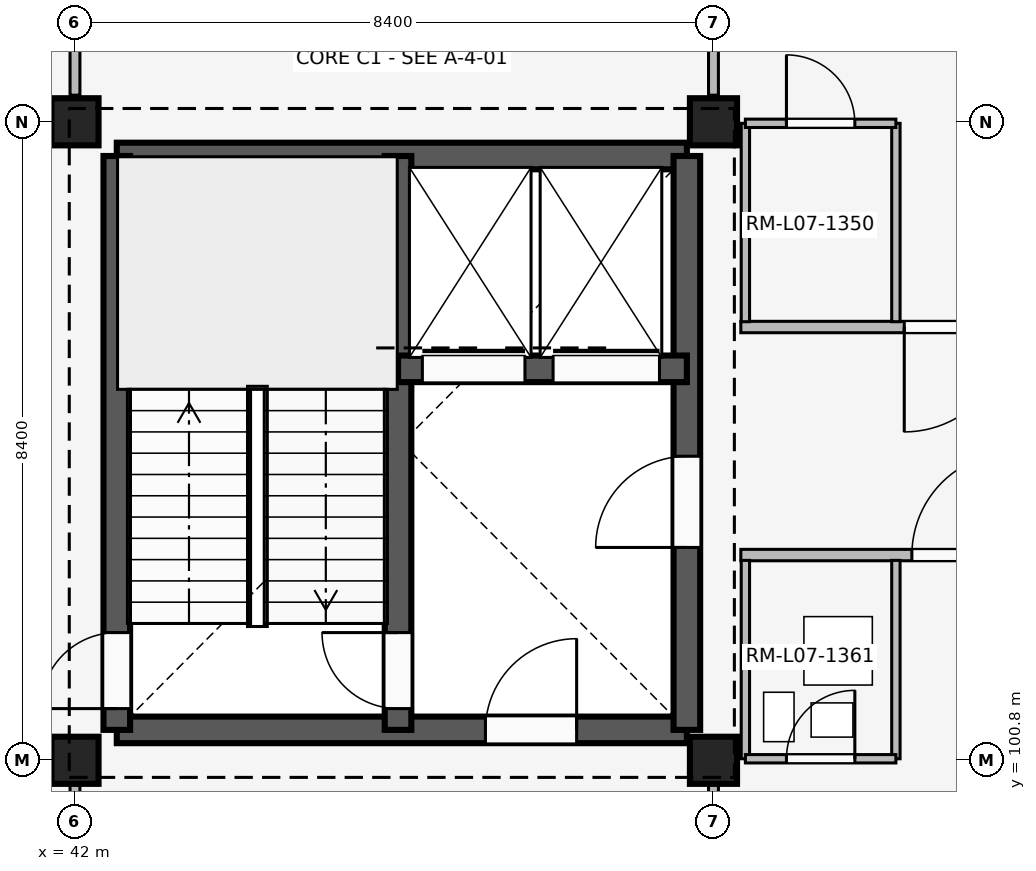
"""IFC4 building model, lengths in metres.
Left out: names, types, materials, properties, quantities, classifications, styles, units other than length and angle.
Written with IfcOpenShell. Run it as: python <this file> out.ifc"""

import sys

from ifc_helpers import new_model, si_unit, direction, frame, frame_2d, origin, origin_2d, place, context, subcontext, project, spatial, rectangle, extrude, element, fill, save


model = new_model("IFC4")
c1 = context("Model", 3, precision=1e-05, world=origin(), true_north=direction((0.0, 1.0)))
c2 = subcontext(c1, "Body", "Model", "MODEL_VIEW")
j1 = project(units=[si_unit("LENGTHUNIT", "METRE"), si_unit("PLANEANGLEUNIT", "RADIAN")], contexts=[c1])
p1 = place(None, origin())
s1 = spatial("IfcSite", under=j1, at=p1, CompositionType="ELEMENT")
p2 = place(p1, origin())
s2 = spatial("IfcBuilding", under=s1, at=p2, CompositionType="ELEMENT")
p3 = place(p2, frame((0.0, 0.0, 28.8)))
s3 = spatial("IfcBuildingStorey", under=s2, at=p3, CompositionType="ELEMENT", Elevation=28.8)
for number, where, z_axis, x_axis in (
    (1, (42.0, 100.8, 0.0), (0.0, 0.0, 1.0), (1.0, 0.0, 0.0)),
    (2, (42.0, 109.2, 0.0), (0.0, 0.0, 1.0), (1.0, 0.0, 0.0)),
    (3, (50.4, 100.8, 0.0), (0.0, 0.0, 1.0), (1.0, 0.0, 0.0)),
    (4, (50.4, 109.2, 0.0), (0.0, 0.0, 1.0), (1.0, 0.0, 0.0)),
):
    element("IfcColumn", number, at=place(p3, frame(where, z_axis=z_axis, x_axis=x_axis)), inside=s3, PredefinedType="COLUMN", context=c2, shape_type="SweptSolid", body=[
        extrude(rectangle(XDim=0.62, YDim=0.62, at=origin_2d()), origin(), (0.0, 0.0, 1.0), 4.2),
    ])
p4 = place(p3, frame((42.55, 101.2, 0.0), z_axis=(0.0, 0.0, 1.0), x_axis=(1.0, 0.0, 0.0)))
e5 = element("IfcWall", 5, at=p4, inside=s3, PredefinedType="SHEAR", context=c2, shape_type="SweptSolid", body=[
    extrude(rectangle(XDim=7.5, YDim=0.35, at=frame_2d((3.75, 0.0))), origin(), (0.0, 0.0, 1.0), 3.94),
])
p5 = place(p4, frame((4.85, 0.0, 0.0)))
e6 = element("IfcOpeningElement", 6, at=p5, cuts=e5, PredefinedType="OPENING", context=c2, shape_type="SweptSolid", body=[
    extrude(rectangle(XDim=1.2, YDim=2.2, at=frame_2d((0.6, 1.1))), frame((0.0, 0.185, 0.0), z_axis=(0.0, -1.0, 0.0), x_axis=(1.0, 0.0, 0.0)), (0.0, 0.0, 1.0), 0.37),
])
p6 = place(p3, frame((42.55, 108.75, 0.0), z_axis=(0.0, 0.0, 1.0), x_axis=(1.0, 0.0, 0.0)))
e7 = element("IfcWall", 7, at=p6, inside=s3, PredefinedType="SHEAR", context=c2, shape_type="SweptSolid", body=[
    extrude(rectangle(XDim=7.5, YDim=0.35, at=frame_2d((3.75, 0.0))), origin(), (0.0, 0.0, 1.0), 3.94),
])
p7 = place(p3, frame((42.55, 101.2, 0.0), z_axis=(0.0, 0.0, 1.0), x_axis=(0.0, 1.0, 0.0)))
e8 = element("IfcWall", 8, at=p7, inside=s3, PredefinedType="SHEAR", context=c2, shape_type="SweptSolid", body=[
    extrude(rectangle(XDim=7.55, YDim=0.35, at=frame_2d((3.775, 0.0))), origin(), (0.0, 0.0, 1.0), 3.94),
])
p8 = place(p7, frame((0.28, 0.0, 0.0)))
e9 = element("IfcOpeningElement", 9, at=p8, cuts=e8, PredefinedType="OPENING", context=c2, shape_type="SweptSolid", body=[
    extrude(rectangle(XDim=1.0, YDim=2.15, at=frame_2d((0.5, 1.075))), frame((0.0, 0.185, 0.0), z_axis=(0.0, -1.0, 0.0), x_axis=(1.0, 0.0, 0.0)), (0.0, 0.0, 1.0), 0.37),
])
p9 = place(p3, frame((50.05, 101.2, 0.0), z_axis=(0.0, 0.0, 1.0), x_axis=(0.0, 1.0, 0.0)))
e10 = element("IfcWall", 10, at=p9, inside=s3, PredefinedType="SHEAR", context=c2, shape_type="SweptSolid", body=[
    extrude(rectangle(XDim=7.55, YDim=0.35, at=frame_2d((3.775, 0.0))), origin(), (0.0, 0.0, 1.0), 3.94),
])
p10 = place(p9, frame((2.4, 0.0, 0.0)))
e11 = element("IfcOpeningElement", 11, at=p10, cuts=e10, PredefinedType="OPENING", context=c2, shape_type="SweptSolid", body=[
    extrude(rectangle(XDim=1.2, YDim=2.2, at=frame_2d((0.6, 1.1))), frame((0.0, 0.185, 0.0), z_axis=(0.0, -1.0, 0.0), x_axis=(1.0, 0.0, 0.0)), (0.0, 0.0, 1.0), 0.37),
])
p11 = place(p3, frame((46.25, 101.2, 0.0), z_axis=(0.0, 0.0, 1.0), x_axis=(0.0, 1.0, 0.0)))
e12 = element("IfcWall", 12, at=p11, inside=s3, PredefinedType="SHEAR", context=c2, shape_type="SweptSolid", body=[
    extrude(rectangle(XDim=7.55, YDim=0.35, at=frame_2d((3.775, 0.0))), origin(), (0.0, 0.0, 1.0), 3.94),
])
p12 = place(p11, frame((0.28, 0.0, 0.0)))
e13 = element("IfcOpeningElement", 13, at=p12, cuts=e12, PredefinedType="OPENING", context=c2, shape_type="SweptSolid", body=[
    extrude(rectangle(XDim=1.0, YDim=2.15, at=frame_2d((0.5, 1.075))), frame((0.0, 0.185, 0.0), z_axis=(0.0, -1.0, 0.0), x_axis=(1.0, 0.0, 0.0)), (0.0, 0.0, 1.0), 0.37),
])
p13 = place(p3, frame((46.25, 105.95, 0.0), z_axis=(0.0, 0.0, 1.0), x_axis=(1.0, 0.0, 0.0)))
e14 = element("IfcWall", 14, at=p13, inside=s3, PredefinedType="SHEAR", context=c2, shape_type="SweptSolid", body=[
    extrude(rectangle(XDim=3.8, YDim=0.35, at=frame_2d((1.9, 0.0))), origin(), (0.0, 0.0, 1.0), 3.94),
])
p14 = place(p13, frame((0.32, 0.0, 0.0)))
e15 = element("IfcOpeningElement", 15, at=p14, cuts=e14, PredefinedType="OPENING", context=c2, shape_type="SweptSolid", body=[
    extrude(rectangle(XDim=1.35, YDim=2.25, at=frame_2d((0.675, 1.125))), frame((0.0, 0.185, 0.0), z_axis=(0.0, -1.0, 0.0), x_axis=(1.0, 0.0, 0.0)), (0.0, 0.0, 1.0), 0.37),
])
p15 = place(p13, frame((2.04, 0.0, 0.0)))
e16 = element("IfcOpeningElement", 16, at=p15, cuts=e14, PredefinedType="OPENING", context=c2, shape_type="SweptSolid", body=[
    extrude(rectangle(XDim=1.4, YDim=2.25, at=frame_2d((0.7, 1.125))), frame((0.0, 0.185, 0.0), z_axis=(0.0, -1.0, 0.0), x_axis=(1.0, 0.0, 0.0)), (0.0, 0.0, 1.0), 0.37),
])
p16 = place(p3, frame((42.0, 92.54, 0.0), z_axis=(0.0, 0.0, 1.0), x_axis=(0.0, 1.0, 0.0)))
e17 = element("IfcWall", 17, at=p16, inside=s3, PredefinedType="PARTITIONING", context=c2, shape_type="SweptSolid", body=[
    extrude(rectangle(XDim=8.21, YDim=0.13, at=frame_2d((4.105, 0.0))), origin(), (0.0, 0.0, 1.0), 3.32),
])
p17 = place(p16, frame((3.64, 0.0, 0.0)))
e18 = element("IfcOpeningElement", 18, at=p17, cuts=e17, PredefinedType="OPENING", context=c2, shape_type="SweptSolid", body=[
    extrude(rectangle(XDim=1.08, YDim=2.15, at=frame_2d((0.54, 1.075))), frame((0.0, 0.075, 0.0), z_axis=(0.0, -1.0, 0.0), x_axis=(1.0, 0.0, 0.0)), (0.0, 0.0, 1.0), 0.15),
])
p18 = place(p3, frame((42.0, 109.55, 0.0), z_axis=(0.0, 0.0, 1.0), x_axis=(0.0, 1.0, 0.0)))
e19 = element("IfcWall", 19, at=p18, inside=s3, PredefinedType="PARTITIONING", context=c2, shape_type="SweptSolid", body=[
    extrude(rectangle(XDim=7.91, YDim=0.13, at=frame_2d((3.955, 0.0))), origin(), (0.0, 0.0, 1.0), 3.32),
])
p19 = place(p18, frame((3.4, 0.0, 0.0)))
e20 = element("IfcOpeningElement", 20, at=p19, cuts=e19, PredefinedType="OPENING", context=c2, shape_type="SweptSolid", body=[
    extrude(rectangle(XDim=1.05, YDim=2.2, at=frame_2d((0.525, 1.1))), frame((0.0, 0.075, 0.0), z_axis=(0.0, -1.0, 0.0), x_axis=(1.0, 0.0, 0.0)), (0.0, 0.0, 1.0), 0.15),
])
p20 = place(p3, frame((50.4, 92.54, 0.0), z_axis=(0.0, 0.0, 1.0), x_axis=(0.0, 1.0, 0.0)))
e21 = element("IfcWall", 21, at=p20, inside=s3, PredefinedType="PARTITIONING", context=c2, shape_type="SweptSolid", body=[
    extrude(rectangle(XDim=8.21, YDim=0.13, at=frame_2d((4.105, 0.0))), origin(), (0.0, 0.0, 1.0), 3.32),
])
p21 = place(p20, frame((3.64, 0.0, 0.0)))
e22 = element("IfcOpeningElement", 22, at=p21, cuts=e21, PredefinedType="OPENING", context=c2, shape_type="SweptSolid", body=[
    extrude(rectangle(XDim=1.08, YDim=2.15, at=frame_2d((0.54, 1.075))), frame((0.0, 0.075, 0.0), z_axis=(0.0, -1.0, 0.0), x_axis=(1.0, 0.0, 0.0)), (0.0, 0.0, 1.0), 0.15),
])
p22 = place(p3, frame((50.4, 109.55, 0.0), z_axis=(0.0, 0.0, 1.0), x_axis=(0.0, 1.0, 0.0)))
e23 = element("IfcWall", 23, at=p22, inside=s3, PredefinedType="PARTITIONING", context=c2, shape_type="SweptSolid", body=[
    extrude(rectangle(XDim=7.91, YDim=0.13, at=frame_2d((3.955, 0.0))), origin(), (0.0, 0.0, 1.0), 3.32),
])
p23 = place(p22, frame((3.4, 0.0, 0.0)))
e24 = element("IfcOpeningElement", 24, at=p23, cuts=e23, PredefinedType="OPENING", context=c2, shape_type="SweptSolid", body=[
    extrude(rectangle(XDim=1.05, YDim=2.2, at=frame_2d((0.525, 1.1))), frame((0.0, 0.075, 0.0), z_axis=(0.0, -1.0, 0.0), x_axis=(1.0, 0.0, 0.0)), (0.0, 0.0, 1.0), 0.15),
])
p24 = place(p3, frame((50.76, 103.5, 0.0), z_axis=(0.0, 0.0, 1.0), x_axis=(1.0, 0.0, 0.0)))
e25 = element("IfcWall", 25, at=p24, inside=s3, PredefinedType="PARTITIONING", context=c2, shape_type="SweptSolid", body=[
    extrude(rectangle(XDim=7.96, YDim=0.15, at=frame_2d((3.98, 0.0))), origin(), (0.0, 0.0, 1.0), 3.32),
])
p25 = place(p24, frame((2.25, 0.0, 0.0)))
e26 = element("IfcOpeningElement", 26, at=p25, cuts=e25, PredefinedType="OPENING", context=c2, shape_type="SweptSolid", body=[
    extrude(rectangle(XDim=1.35, YDim=2.25, at=frame_2d((0.675, 1.125))), frame((0.0, 0.085, 0.0), z_axis=(0.0, -1.0, 0.0), x_axis=(1.0, 0.0, 0.0)), (0.0, 0.0, 1.0), 0.17),
])
p26 = place(p24, frame((5.95, 0.0, 0.0)))
e27 = element("IfcOpeningElement", 27, at=p26, cuts=e25, PredefinedType="OPENING", context=c2, shape_type="SweptSolid", body=[
    extrude(rectangle(XDim=1.35, YDim=2.25, at=frame_2d((0.675, 1.125))), frame((0.0, 0.085, 0.0), z_axis=(0.0, -1.0, 0.0), x_axis=(1.0, 0.0, 0.0)), (0.0, 0.0, 1.0), 0.17),
])
for number, where, z_axis, x_axis in (
    (28, (50.82, 100.82, 0.0), (0.0, 0.0, 1.0), (0.0, 1.0, 0.0)),
    (29, (52.8, 100.82, 0.0), (0.0, 0.0, 1.0), (0.0, 1.0, 0.0)),
):
    element("IfcWall", number, at=place(p3, frame(where, z_axis=z_axis, x_axis=x_axis)), inside=s3, PredefinedType="PARTITIONING", context=c2, shape_type="SweptSolid", body=[
        extrude(rectangle(XDim=2.61, YDim=0.11, at=frame_2d((1.305, 0.0))), origin(), (0.0, 0.0, 1.0), 3.32),
    ])
p27 = place(p3, frame((50.82, 100.82, 0.0), z_axis=(0.0, 0.0, 1.0), x_axis=(1.0, 0.0, 0.0)))
e30 = element("IfcWall", 30, at=p27, inside=s3, PredefinedType="PARTITIONING", context=c2, shape_type="SweptSolid", body=[
    extrude(rectangle(XDim=1.98, YDim=0.11, at=frame_2d((0.99, 0.0))), origin(), (0.0, 0.0, 1.0), 3.32),
])
p28 = place(p27, frame((0.54, 0.0, 0.0)))
e31 = element("IfcOpeningElement", 31, at=p28, cuts=e30, PredefinedType="OPENING", context=c2, shape_type="SweptSolid", body=[
    extrude(rectangle(XDim=0.9, YDim=2.1, at=frame_2d((0.45, 1.05))), frame((0.0, 0.065, 0.0), z_axis=(0.0, -1.0, 0.0), x_axis=(1.0, 0.0, 0.0)), (0.0, 0.0, 1.0), 0.13),
])
p29 = place(p3, frame((58.72, 106.5, 0.0), z_axis=(0.0, 0.0, 1.0), x_axis=(-1.0, 0.0, 0.0)))
e32 = element("IfcWall", 32, at=p29, inside=s3, PredefinedType="PARTITIONING", context=c2, shape_type="SweptSolid", body=[
    extrude(rectangle(XDim=7.96, YDim=0.15, at=frame_2d((3.98, 0.0))), origin(), (0.0, 0.0, 1.0), 3.32),
])
p30 = place(p29, frame((0.73, 0.0, 0.0)))
e33 = element("IfcOpeningElement", 33, at=p30, cuts=e32, PredefinedType="OPENING", context=c2, shape_type="SweptSolid", body=[
    extrude(rectangle(XDim=1.38, YDim=2.25, at=frame_2d((0.69, 1.125))), frame((0.0, 0.085, 0.0), z_axis=(0.0, -1.0, 0.0), x_axis=(1.0, 0.0, 0.0)), (0.0, 0.0, 1.0), 0.17),
])
p31 = place(p29, frame((4.43, 0.0, 0.0)))
e34 = element("IfcOpeningElement", 34, at=p31, cuts=e32, PredefinedType="OPENING", context=c2, shape_type="SweptSolid", body=[
    extrude(rectangle(XDim=1.38, YDim=2.25, at=frame_2d((0.69, 1.125))), frame((0.0, 0.085, 0.0), z_axis=(0.0, -1.0, 0.0), x_axis=(1.0, 0.0, 0.0)), (0.0, 0.0, 1.0), 0.17),
])
for number, where, z_axis, x_axis in (
    (35, (50.82, 106.57, 0.0), (0.0, 0.0, 1.0), (0.0, 1.0, 0.0)),
    (36, (52.8, 106.57, 0.0), (0.0, 0.0, 1.0), (0.0, 1.0, 0.0)),
):
    element("IfcWall", number, at=place(p3, frame(where, z_axis=z_axis, x_axis=x_axis)), inside=s3, PredefinedType="PARTITIONING", context=c2, shape_type="SweptSolid", body=[
        extrude(rectangle(XDim=2.61, YDim=0.11, at=frame_2d((1.305, 0.0))), origin(), (0.0, 0.0, 1.0), 3.32),
    ])
p32 = place(p3, frame((50.82, 109.18, 0.0), z_axis=(0.0, 0.0, 1.0), x_axis=(1.0, 0.0, 0.0)))
e37 = element("IfcWall", 37, at=p32, inside=s3, PredefinedType="PARTITIONING", context=c2, shape_type="SweptSolid", body=[
    extrude(rectangle(XDim=1.98, YDim=0.11, at=frame_2d((0.99, 0.0))), origin(), (0.0, 0.0, 1.0), 3.32),
])
p33 = place(p32, frame((0.54, 0.0, 0.0)))
e38 = element("IfcOpeningElement", 38, at=p33, cuts=e37, PredefinedType="OPENING", context=c2, shape_type="SweptSolid", body=[
    extrude(rectangle(XDim=0.9, YDim=2.1, at=frame_2d((0.45, 1.05))), frame((0.0, 0.065, 0.0), z_axis=(0.0, -1.0, 0.0), x_axis=(1.0, 0.0, 0.0)), (0.0, 0.0, 1.0), 0.13),
])
p34 = place(p10, origin())
e39 = element("IfcDoor", 39, at=p34, inside=s3, OperationType="SINGLE_SWING_LEFT", PredefinedType="DOOR", context=c2, shape_type="SweptSolid", body=[
    extrude(rectangle(XDim=1.2, YDim=2.2, at=frame_2d((0.6, 1.1))), frame((0.0, 0.025, 0.0), z_axis=(0.0, -1.0, 0.0), x_axis=(1.0, 0.0, 0.0)), (0.0, 0.0, 1.0), 0.05),
])
fill(e11, e39)
p35 = place(p5, origin())
e40 = element("IfcDoor", 40, at=p35, inside=s3, OperationType="SINGLE_SWING_RIGHT", PredefinedType="DOOR", context=c2, shape_type="SweptSolid", body=[
    extrude(rectangle(XDim=1.2, YDim=2.2, at=frame_2d((0.6, 1.1))), frame((0.0, 0.025, 0.0), z_axis=(0.0, -1.0, 0.0), x_axis=(1.0, 0.0, 0.0)), (0.0, 0.0, 1.0), 0.05),
])
fill(e6, e40)
p36 = place(p8, origin())
e41 = element("IfcDoor", 41, at=p36, inside=s3, OperationType="SINGLE_SWING_LEFT", PredefinedType="DOOR", context=c2, shape_type="SweptSolid", body=[
    extrude(rectangle(XDim=1.0, YDim=2.15, at=frame_2d((0.5, 1.075))), frame((0.0, 0.025, 0.0), z_axis=(0.0, -1.0, 0.0), x_axis=(1.0, 0.0, 0.0)), (0.0, 0.0, 1.0), 0.05),
])
fill(e9, e41)
p37 = place(p12, origin())
e42 = element("IfcDoor", 42, at=p37, inside=s3, OperationType="SINGLE_SWING_RIGHT", PredefinedType="DOOR", context=c2, shape_type="SweptSolid", body=[
    extrude(rectangle(XDim=1.0, YDim=2.15, at=frame_2d((0.5, 1.075))), frame((0.0, 0.025, 0.0), z_axis=(0.0, -1.0, 0.0), x_axis=(1.0, 0.0, 0.0)), (0.0, 0.0, 1.0), 0.05),
])
fill(e13, e42)
p38 = place(p14, origin())
e43 = element("IfcDoor", 43, at=p38, inside=s3, OperationType="SLIDING_TO_LEFT", PredefinedType="DOOR", context=c2, shape_type="SweptSolid", body=[
    extrude(rectangle(XDim=1.35, YDim=2.25, at=frame_2d((0.675, 1.125))), frame((0.0, 0.025, 0.0), z_axis=(0.0, -1.0, 0.0), x_axis=(1.0, 0.0, 0.0)), (0.0, 0.0, 1.0), 0.05),
])
fill(e15, e43)
p39 = place(p15, origin())
e44 = element("IfcDoor", 44, at=p39, inside=s3, OperationType="SLIDING_TO_LEFT", PredefinedType="DOOR", context=c2, shape_type="SweptSolid", body=[
    extrude(rectangle(XDim=1.4, YDim=2.25, at=frame_2d((0.7, 1.125))), frame((0.0, 0.025, 0.0), z_axis=(0.0, -1.0, 0.0), x_axis=(1.0, 0.0, 0.0)), (0.0, 0.0, 1.0), 0.05),
])
fill(e16, e44)
p40 = place(p25, origin())
e45 = element("IfcDoor", 45, at=p40, inside=s3, OperationType="SINGLE_SWING_RIGHT", PredefinedType="DOOR", context=c2, shape_type="SweptSolid", body=[
    extrude(rectangle(XDim=1.35, YDim=2.25, at=frame_2d((0.675, 1.125))), frame((0.0, 0.025, 0.0), z_axis=(0.0, -1.0, 0.0), x_axis=(1.0, 0.0, 0.0)), (0.0, 0.0, 1.0), 0.05),
])
fill(e26, e45)
p41 = place(p28, origin())
e46 = element("IfcDoor", 46, at=p41, inside=s3, OperationType="SINGLE_SWING_RIGHT", PredefinedType="DOOR", context=c2, shape_type="SweptSolid", body=[
    extrude(rectangle(XDim=0.9, YDim=2.1, at=frame_2d((0.45, 1.05))), frame((0.0, 0.025, 0.0), z_axis=(0.0, -1.0, 0.0), x_axis=(1.0, 0.0, 0.0)), (0.0, 0.0, 1.0), 0.05),
])
fill(e31, e46)
p42 = place(p31, origin())
e47 = element("IfcDoor", 47, at=p42, inside=s3, OperationType="SINGLE_SWING_RIGHT", PredefinedType="DOOR", context=c2, shape_type="SweptSolid", body=[
    extrude(rectangle(XDim=1.38, YDim=2.25, at=frame_2d((0.69, 1.125))), frame((0.0, 0.025, 0.0), z_axis=(0.0, -1.0, 0.0), x_axis=(1.0, 0.0, 0.0)), (0.0, 0.0, 1.0), 0.05),
])
fill(e34, e47)
p43 = place(p33, origin())
e48 = element("IfcDoor", 48, at=p43, inside=s3, OperationType="SINGLE_SWING_LEFT", PredefinedType="DOOR", context=c2, shape_type="SweptSolid", body=[
    extrude(rectangle(XDim=0.9, YDim=2.1, at=frame_2d((0.45, 1.05))), frame((0.0, 0.025, 0.0), z_axis=(0.0, -1.0, 0.0), x_axis=(1.0, 0.0, 0.0)), (0.0, 0.0, 1.0), 0.05),
])
fill(e38, e48)
save(model, sys.argv[1])
